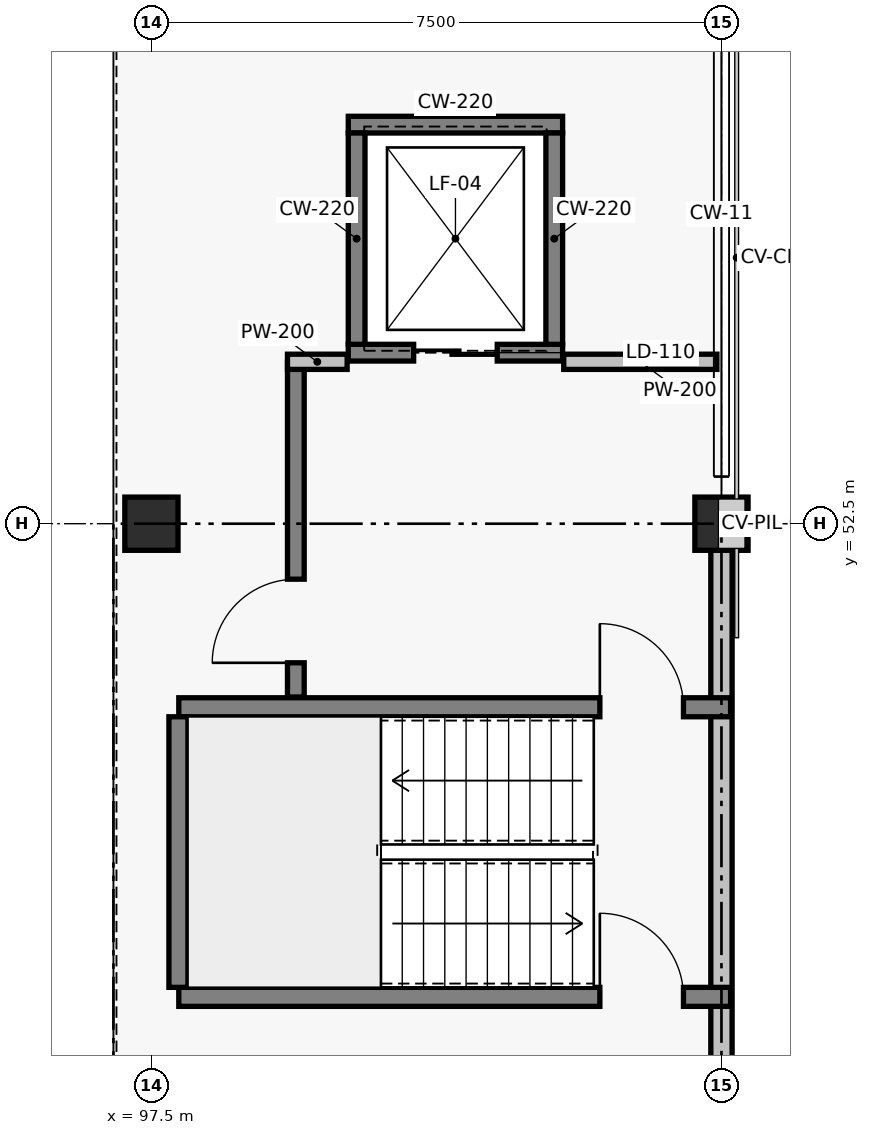
"""IFC4 building model, lengths in metres.
Left out: names, types, materials, properties, quantities, classifications, styles, units other than length and angle.
Written with IfcOpenShell. Run it as: python <this file> out.ifc"""

import sys

from ifc_helpers import new_model, si_unit, direction, frame, frame_2d, origin, origin_2d, place, context, subcontext, project, spatial, rectangle, extrude, element, fill, save


model = new_model("IFC4")
c1 = context("Model", 3, precision=1e-05, world=origin(), true_north=direction((0.0, 1.0)))
c2 = subcontext(c1, "Body", "Model", "MODEL_VIEW")
j1 = project(units=[si_unit("LENGTHUNIT", "METRE"), si_unit("PLANEANGLEUNIT", "RADIAN")], contexts=[c1])
p1 = place(None, origin())
s1 = spatial("IfcSite", under=j1, at=p1, CompositionType="ELEMENT")
p2 = place(p1, origin())
s2 = spatial("IfcBuilding", under=s1, at=p2, CompositionType="ELEMENT")
p3 = place(p2, frame((0.0, 0.0, 17.1)))
s3 = spatial("IfcBuildingStorey", under=s2, at=p3, CompositionType="ELEMENT", Elevation=17.1)
for number, where, z_axis, x_axis in (
    (1, (97.5, 52.5, 0.0), (0.0, 0.0, 1.0), (1.0, 0.0, 0.0)),
    (2, (105.0, 52.5, 0.0), (0.0, 0.0, 1.0), (1.0, 0.0, 0.0)),
):
    element("IfcColumn", number, at=place(p3, frame(where, z_axis=z_axis, x_axis=x_axis)), inside=s3, PredefinedType="COLUMN", context=c2, shape_type="SweptSolid", body=[
        extrude(rectangle(XDim=0.7, YDim=0.7, at=origin_2d()), origin(), (0.0, 0.0, 1.0), 3.9),
    ])
p4 = place(p3, frame((105.0, 45.3, 0.0), z_axis=(0.0, 0.0, 1.0), x_axis=(0.0, 1.0, 0.0)))
e3 = element("IfcWall", 3, at=p4, inside=s3, PredefinedType="SOLIDWALL", context=c2, shape_type="SweptSolid", body=[
    extrude(rectangle(XDim=6.9, YDim=0.28, at=frame_2d((3.45, 0.0))), origin(), (0.0, 0.0, 1.0), 2.54),
])
p5 = place(p3, frame((97.86, 46.275, 0.0), z_axis=(0.0, 0.0, 1.0), x_axis=(1.0, 0.0, 0.0)))
e4 = element("IfcWall", 4, at=p5, inside=s3, PredefinedType="SOLIDWALL", context=c2, shape_type="SweptSolid", body=[
    extrude(rectangle(XDim=7.26, YDim=0.25, at=frame_2d((3.63, 0.0))), origin(), (0.0, 0.0, 1.0), 3.62),
])
p6 = place(p5, frame((5.54, 0.0, 0.0)))
e5 = element("IfcOpeningElement", 5, at=p6, cuts=e4, PredefinedType="OPENING", context=c2, shape_type="SweptSolid", body=[
    extrude(rectangle(XDim=1.1, YDim=2.15, at=frame_2d((0.55, 1.075))), frame((0.0, 0.135, 0.0), z_axis=(0.0, -1.0, 0.0), x_axis=(1.0, 0.0, 0.0)), (0.0, 0.0, 1.0), 0.27),
])
p7 = place(p3, frame((97.86, 50.085, 0.0), z_axis=(0.0, 0.0, 1.0), x_axis=(1.0, 0.0, 0.0)))
e6 = element("IfcWall", 6, at=p7, inside=s3, PredefinedType="SOLIDWALL", context=c2, shape_type="SweptSolid", body=[
    extrude(rectangle(XDim=7.26, YDim=0.25, at=frame_2d((3.63, 0.0))), origin(), (0.0, 0.0, 1.0), 3.62),
])
p8 = place(p7, frame((5.54, 0.0, 0.0)))
e7 = element("IfcOpeningElement", 7, at=p8, cuts=e6, PredefinedType="OPENING", context=c2, shape_type="SweptSolid", body=[
    extrude(rectangle(XDim=1.1, YDim=2.15, at=frame_2d((0.55, 1.075))), frame((0.0, 0.135, 0.0), z_axis=(0.0, -1.0, 0.0), x_axis=(1.0, 0.0, 0.0)), (0.0, 0.0, 1.0), 0.27),
])
p9 = place(p3, frame((97.855, 46.4, 0.0), z_axis=(0.0, 0.0, 1.0), x_axis=(0.0, 1.0, 0.0)))
e8 = element("IfcWall", 8, at=p9, inside=s3, PredefinedType="SOLIDWALL", context=c2, shape_type="SweptSolid", body=[
    extrude(rectangle(XDim=3.56, YDim=0.25, at=frame_2d((1.78, 0.0))), origin(), (0.0, 0.0, 1.0), 3.62),
])
p10 = place(p3, frame((100.09, 54.75, 0.0), z_axis=(0.0, 0.0, 1.0), x_axis=(1.0, 0.0, 0.0)))
e9 = element("IfcWall", 9, at=p10, inside=s3, PredefinedType="SOLIDWALL", context=c2, shape_type="SweptSolid", body=[
    extrude(rectangle(XDim=2.82, YDim=0.22, at=frame_2d((1.41, 0.0))), origin(), (0.0, 0.0, 1.0), 3.62),
])
p11 = place(p10, frame((0.86, 0.0, 0.0)))
e10 = element("IfcOpeningElement", 10, at=p11, cuts=e9, PredefinedType="OPENING", context=c2, shape_type="SweptSolid", body=[
    extrude(rectangle(XDim=1.1, YDim=2.15, at=frame_2d((0.55, 1.075))), frame((0.0, 0.12, 0.0), z_axis=(0.0, -1.0, 0.0), x_axis=(1.0, 0.0, 0.0)), (0.0, 0.0, 1.0), 0.24),
])
p12 = place(p3, frame((100.09, 57.75, 0.0), z_axis=(0.0, 0.0, 1.0), x_axis=(1.0, 0.0, 0.0)))
e11 = element("IfcWall", 11, at=p12, inside=s3, PredefinedType="SOLIDWALL", context=c2, shape_type="SweptSolid", body=[
    extrude(rectangle(XDim=2.82, YDim=0.22, at=frame_2d((1.41, 0.0))), origin(), (0.0, 0.0, 1.0), 3.62),
])
for number, where, z_axis, x_axis in (
    (12, (100.2, 54.86, 0.0), (0.0, 0.0, 1.0), (0.0, 1.0, 0.0)),
    (13, (102.8, 54.86, 0.0), (0.0, 0.0, 1.0), (0.0, 1.0, 0.0)),
):
    element("IfcWall", number, at=place(p3, frame(where, z_axis=z_axis, x_axis=x_axis)), inside=s3, PredefinedType="SOLIDWALL", context=c2, shape_type="SweptSolid", body=[
        extrude(rectangle(XDim=2.78, YDim=0.22, at=frame_2d((1.39, 0.0))), origin(), (0.0, 0.0, 1.0), 3.62),
    ])
p13 = place(p3, frame((99.4, 50.22, 0.0), z_axis=(0.0, 0.0, 1.0), x_axis=(0.0, 1.0, 0.0)))
e14 = element("IfcWall", 14, at=p13, inside=s3, PredefinedType="SOLIDWALL", context=c2, shape_type="SweptSolid", body=[
    extrude(rectangle(XDim=4.41, YDim=0.22, at=frame_2d((2.205, 0.0))), origin(), (0.0, 0.0, 1.0), 3.62),
])
p14 = place(p13, frame((0.45, 0.0, 0.0)))
e15 = element("IfcOpeningElement", 15, at=p14, cuts=e14, PredefinedType="OPENING", context=c2, shape_type="SweptSolid", body=[
    extrude(rectangle(XDim=1.1, YDim=2.15, at=frame_2d((0.55, 1.075))), frame((0.0, 0.12, 0.0), z_axis=(0.0, -1.0, 0.0), x_axis=(1.0, 0.0, 0.0)), (0.0, 0.0, 1.0), 0.24),
])
p15 = place(p3, frame((99.29, 54.63, 0.0), z_axis=(0.0, 0.0, 1.0), x_axis=(1.0, 0.0, 0.0)))
e16 = element("IfcWall", 16, at=p15, inside=s3, PredefinedType="PARTITIONING", context=c2, shape_type="SweptSolid", body=[
    extrude(rectangle(XDim=0.785, YDim=0.2, at=frame_2d((0.393, 0.0))), origin(), (0.0, 0.0, 1.0), 3.6),
])
p16 = place(p3, frame((102.925, 54.63, 0.0), z_axis=(0.0, 0.0, 1.0), x_axis=(1.0, 0.0, 0.0)))
e17 = element("IfcWall", 17, at=p16, inside=s3, PredefinedType="PARTITIONING", context=c2, shape_type="SweptSolid", body=[
    extrude(rectangle(XDim=2.015, YDim=0.2, at=frame_2d((1.007, 0.0))), origin(), (0.0, 0.0, 1.0), 3.0),
])
p17 = place(p6, origin())
e18 = element("IfcDoor", 18, at=p17, inside=s3, OperationType="SINGLE_SWING_LEFT", PredefinedType="DOOR", context=c2, shape_type="SweptSolid", body=[
    extrude(rectangle(XDim=1.1, YDim=2.15, at=frame_2d((0.55, 1.075))), frame((0.0, 0.025, 0.0), z_axis=(0.0, -1.0, 0.0), x_axis=(1.0, 0.0, 0.0)), (0.0, 0.0, 1.0), 0.05),
])
fill(e5, e18)
p18 = place(p8, frame((1.1, 0.0, 0.0), z_axis=(0.0, 0.0, 1.0), x_axis=(-1.0, 0.0, 0.0)))
e19 = element("IfcDoor", 19, at=p18, inside=s3, OperationType="SINGLE_SWING_RIGHT", PredefinedType="DOOR", context=c2, shape_type="SweptSolid", body=[
    extrude(rectangle(XDim=1.1, YDim=2.15, at=frame_2d((0.55, 1.075))), frame((0.0, 0.025, 0.0), z_axis=(0.0, -1.0, 0.0), x_axis=(1.0, 0.0, 0.0)), (0.0, 0.0, 1.0), 0.05),
])
fill(e7, e19)
p19 = place(p11, origin())
e20 = element("IfcDoor", 20, at=p19, inside=s3, OperationType="SLIDING_TO_LEFT", PredefinedType="DOOR", context=c2, shape_type="SweptSolid", body=[
    extrude(rectangle(XDim=1.1, YDim=2.15, at=frame_2d((0.55, 1.075))), frame((0.0, 0.025, 0.0), z_axis=(0.0, -1.0, 0.0), x_axis=(1.0, 0.0, 0.0)), (0.0, 0.0, 1.0), 0.05),
])
fill(e10, e20)
p20 = place(p14, origin())
e21 = element("IfcDoor", 21, at=p20, inside=s3, OperationType="SINGLE_SWING_LEFT", PredefinedType="DOOR", context=c2, shape_type="SweptSolid", body=[
    extrude(rectangle(XDim=1.1, YDim=2.15, at=frame_2d((0.55, 1.075))), frame((0.0, 0.025, 0.0), z_axis=(0.0, -1.0, 0.0), x_axis=(1.0, 0.0, 0.0)), (0.0, 0.0, 1.0), 0.05),
])
fill(e15, e21)
save(model, sys.argv[1])
